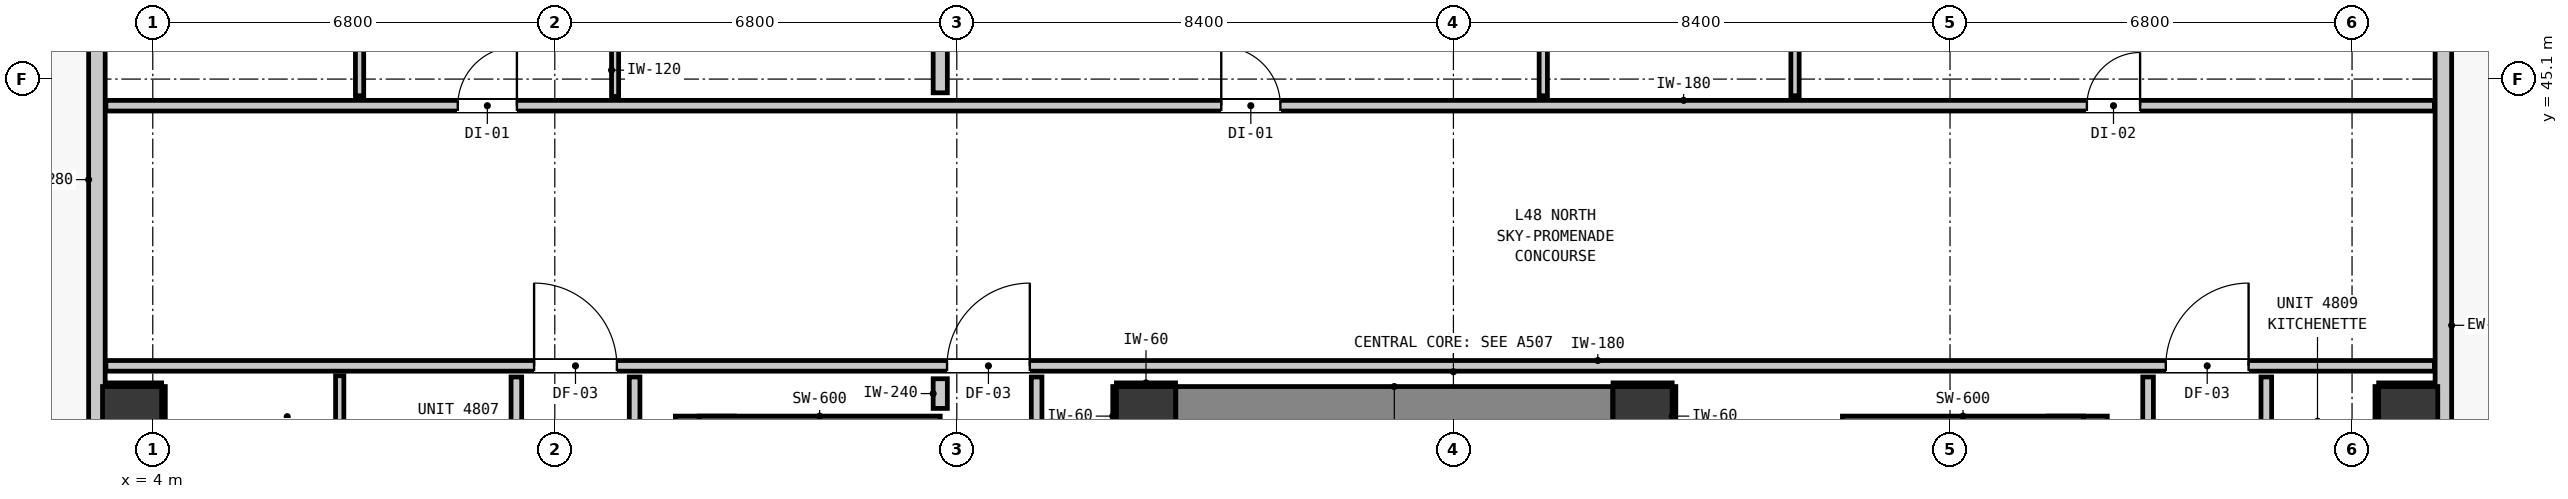
"""IFC4 building model, lengths in metres.
Left out: names, types, materials, properties, quantities, classifications, styles, units other than length and angle.
Written with IfcOpenShell. Run it as: python <this file> out.ifc"""

import sys

from ifc_helpers import new_model, si_unit, direction, frame, frame_2d, origin, origin_2d, place, context, subcontext, project, spatial, rectangle, extrude, element, fill, save


model = new_model("IFC4")
c1 = context("Model", 3, precision=1e-05, world=origin(), true_north=direction((0.0, 1.0)))
c2 = subcontext(c1, "Body", "Model", "MODEL_VIEW")
j1 = project(units=[si_unit("LENGTHUNIT", "METRE"), si_unit("PLANEANGLEUNIT", "RADIAN")], contexts=[c1])
p1 = place(None, origin())
s1 = spatial("IfcSite", under=j1, at=p1, CompositionType="ELEMENT")
p2 = place(p1, origin())
s2 = spatial("IfcBuilding", under=s1, at=p2, CompositionType="ELEMENT")
p3 = place(p2, frame((0.0, 0.0, 165.84)))
s3 = spatial("IfcBuildingStorey", under=s2, at=p3, CompositionType="ELEMENT", Elevation=165.84)
for number, where, z_axis, x_axis in (
    (1, (20.8, 39.4, 0.0), (0.0, 0.0, 1.0), (1.0, 0.0, 0.0)),
    (2, (29.2, 39.4, 0.0), (0.0, 0.0, 1.0), (1.0, 0.0, 0.0)),
):
    element("IfcColumn", number, at=place(p3, frame(where, z_axis=z_axis, x_axis=x_axis)), inside=s3, PredefinedType="COLUMN", context=c2, shape_type="SweptSolid", body=[
        extrude(rectangle(XDim=1.0, YDim=1.0, at=origin_2d()), origin(), (0.0, 0.0, 1.0), 3.32),
    ])
p4 = place(p3, frame((13.34, 31.205, 0.0), z_axis=(0.0, 0.0, 1.0), x_axis=(0.0, 1.0, 0.0)))
e3 = element("IfcWall", 3, at=p4, inside=s3, PredefinedType="SHEAR", context=c2, shape_type="SweptSolid", body=[
    extrude(rectangle(XDim=8.195, YDim=1.0, at=frame_2d((4.097, 0.0))), origin(), (0.0, 0.0, 1.0), 3.32),
])
p5 = place(p3, frame((13.24, 39.1, 0.0), z_axis=(0.0, 0.0, 1.0), x_axis=(1.0, 0.0, 0.0)))
e4 = element("IfcWall", 4, at=p5, inside=s3, PredefinedType="SHEAR", context=c2, shape_type="SweptSolid", body=[
    extrude(rectangle(XDim=4.08, YDim=0.6, at=frame_2d((2.04, 0.0))), origin(), (0.0, 0.0, 1.0), 3.32),
])
p6 = place(p3, frame((36.56, 31.205, 0.0), z_axis=(0.0, 0.0, 1.0), x_axis=(0.0, 1.0, 0.0)))
e5 = element("IfcWall", 5, at=p6, inside=s3, PredefinedType="SHEAR", context=c2, shape_type="SweptSolid", body=[
    extrude(rectangle(XDim=8.195, YDim=1.0, at=frame_2d((4.097, 0.0))), origin(), (0.0, 0.0, 1.0), 3.32),
])
p7 = place(p3, frame((32.58, 39.1, 0.0), z_axis=(0.0, 0.0, 1.0), x_axis=(1.0, 0.0, 0.0)))
e6 = element("IfcWall", 6, at=p7, inside=s3, PredefinedType="SHEAR", context=c2, shape_type="SweptSolid", body=[
    extrude(rectangle(XDim=4.08, YDim=0.6, at=frame_2d((2.04, 0.0))), origin(), (0.0, 0.0, 1.0), 3.32),
])
p8 = place(p3, frame((21.305, 39.4, 0.0), z_axis=(0.0, 0.0, 1.0), x_axis=(1.0, 0.0, 0.0)))
e7 = element("IfcWall", 7, at=p8, inside=s3, PredefinedType="SHEAR", context=c2, shape_type="SweptSolid", body=[
    extrude(rectangle(XDim=7.39, YDim=1.0, at=frame_2d((3.695, 0.0))), origin(), (0.0, 0.0, 1.0), 3.32),
])
for number, where, z_axis, x_axis in (
    (8, (3.65, 39.4, -0.2), (0.0, 0.0, 1.0), (1.0, 0.0, 0.0)),
    (9, (42.15, 39.4, -0.2), (0.0, 0.0, 1.0), (1.0, 0.0, 0.0)),
):
    element("IfcColumn", number, at=place(p3, frame(where, z_axis=z_axis, x_axis=x_axis)), inside=s3, PredefinedType="COLUMN", context=c2, shape_type="SweptSolid", body=[
        extrude(rectangle(XDim=1.0, YDim=1.0, at=origin_2d()), origin(), (0.0, 0.0, 1.0), 3.52),
    ])
p9 = place(p3, frame((3.055, 17.555, 0.0), z_axis=(0.0, 0.0, 1.0), x_axis=(0.0, 1.0, 0.0)))
e10 = element("IfcWall", 10, at=p9, inside=s3, PredefinedType="STANDARD", context=c2, shape_type="SweptSolid", body=[
    extrude(rectangle(XDim=32.29, YDim=0.28, at=frame_2d((16.145, 0.0))), origin(), (0.0, 0.0, 1.0), 3.08),
])
p10 = place(p9, frame((6.871, 0.0, 0.0)))
e11 = element("IfcOpeningElement", 11, at=p10, cuts=e10, PredefinedType="OPENING", context=c2, shape_type="SweptSolid", body=[
    extrude(rectangle(XDim=1.0, YDim=2.15, at=frame_2d((0.5, 1.075))), frame((0.0, 0.15, 0.0), z_axis=(0.0, -1.0, 0.0), x_axis=(1.0, 0.0, 0.0)), (0.0, 0.0, 1.0), 0.3),
])
p11 = place(p9, frame((30.527, 0.0, 0.85)))
e12 = element("IfcOpeningElement", 12, at=p11, cuts=e10, PredefinedType="OPENING", context=c2, shape_type="SweptSolid", body=[
    extrude(rectangle(XDim=1.5, YDim=1.8, at=frame_2d((0.75, 0.9))), frame((0.0, 0.15, 0.0), z_axis=(0.0, -1.0, 0.0), x_axis=(1.0, 0.0, 0.0)), (0.0, 0.0, 1.0), 0.3),
])
p12 = place(p9, frame((8.375, 0.0, 0.85)))
e13 = element("IfcOpeningElement", 13, at=p12, cuts=e10, PredefinedType="OPENING", context=c2, shape_type="SweptSolid", body=[
    extrude(rectangle(XDim=1.5, YDim=1.8, at=frame_2d((0.75, 0.9))), frame((0.0, 0.15, 0.0), z_axis=(0.0, -1.0, 0.0), x_axis=(1.0, 0.0, 0.0)), (0.0, 0.0, 1.0), 0.3),
])
p13 = place(p9, frame((10.762, 0.0, 0.85)))
e14 = element("IfcOpeningElement", 14, at=p13, cuts=e10, PredefinedType="OPENING", context=c2, shape_type="SweptSolid", body=[
    extrude(rectangle(XDim=1.5, YDim=1.8, at=frame_2d((0.75, 0.9))), frame((0.0, 0.15, 0.0), z_axis=(0.0, -1.0, 0.0), x_axis=(1.0, 0.0, 0.0)), (0.0, 0.0, 1.0), 0.3),
])
p14 = place(p9, frame((17.075, 0.0, 0.85)))
e15 = element("IfcOpeningElement", 15, at=p14, cuts=e10, PredefinedType="OPENING", context=c2, shape_type="SweptSolid", body=[
    extrude(rectangle(XDim=1.5, YDim=1.8, at=frame_2d((0.75, 0.9))), frame((0.0, 0.15, 0.0), z_axis=(0.0, -1.0, 0.0), x_axis=(1.0, 0.0, 0.0)), (0.0, 0.0, 1.0), 0.3),
])
p15 = place(p9, frame((20.113, 0.0, 0.85)))
e16 = element("IfcOpeningElement", 16, at=p15, cuts=e10, PredefinedType="OPENING", context=c2, shape_type="SweptSolid", body=[
    extrude(rectangle(XDim=1.05, YDim=1.65, at=frame_2d((0.525, 0.825))), frame((0.0, 0.15, 0.0), z_axis=(0.0, -1.0, 0.0), x_axis=(1.0, 0.0, 0.0)), (0.0, 0.0, 1.0), 0.3),
])
p16 = place(p3, frame((42.745, 49.845, 0.0), z_axis=(0.0, 0.0, 1.0), x_axis=(0.0, -1.0, 0.0)))
e17 = element("IfcWall", 17, at=p16, inside=s3, PredefinedType="STANDARD", context=c2, shape_type="SweptSolid", body=[
    extrude(rectangle(XDim=32.29, YDim=0.28, at=frame_2d((16.145, 0.0))), origin(), (0.0, 0.0, 1.0), 3.08),
])
p17 = place(p16, frame((0.503, 0.0, 0.0)))
e18 = element("IfcOpeningElement", 18, at=p17, cuts=e17, PredefinedType="OPENING", context=c2, shape_type="SweptSolid", body=[
    extrude(rectangle(XDim=1.1, YDim=2.15, at=frame_2d((0.55, 1.075))), frame((0.0, 0.15, 0.0), z_axis=(0.0, -1.0, 0.0), x_axis=(1.0, 0.0, 0.0)), (0.0, 0.0, 1.0), 0.3),
])
p18 = place(p16, frame((2.699, 0.0, 0.85)))
e19 = element("IfcOpeningElement", 19, at=p18, cuts=e17, PredefinedType="OPENING", context=c2, shape_type="SweptSolid", body=[
    extrude(rectangle(XDim=1.5, YDim=1.8, at=frame_2d((0.75, 0.9))), frame((0.0, 0.15, 0.0), z_axis=(0.0, -1.0, 0.0), x_axis=(1.0, 0.0, 0.0)), (0.0, 0.0, 1.0), 0.3),
])
p19 = place(p16, frame((23.17, 0.0, 0.85)))
e20 = element("IfcOpeningElement", 20, at=p19, cuts=e17, PredefinedType="OPENING", context=c2, shape_type="SweptSolid", body=[
    extrude(rectangle(XDim=1.5, YDim=1.8, at=frame_2d((0.75, 0.9))), frame((0.0, 0.15, 0.0), z_axis=(0.0, -1.0, 0.0), x_axis=(1.0, 0.0, 0.0)), (0.0, 0.0, 1.0), 0.3),
])
p20 = place(p16, frame((13.62, 0.0, 0.85)))
e21 = element("IfcOpeningElement", 21, at=p20, cuts=e17, PredefinedType="OPENING", context=c2, shape_type="SweptSolid", body=[
    extrude(rectangle(XDim=1.5, YDim=1.8, at=frame_2d((0.75, 0.9))), frame((0.0, 0.15, 0.0), z_axis=(0.0, -1.0, 0.0), x_axis=(1.0, 0.0, 0.0)), (0.0, 0.0, 1.0), 0.3),
])
p21 = place(p3, frame((3.207, 40.25, 0.0), z_axis=(0.0, 0.0, 1.0), x_axis=(1.0, 0.0, 0.0)))
e22 = element("IfcWall", 22, at=p21, inside=s3, PredefinedType="PARTITIONING", context=c2, shape_type="SweptSolid", body=[
    extrude(rectangle(XDim=39.386, YDim=0.18, at=frame_2d((19.693, 0.0))), origin(), (0.0, 0.0, 1.0), 3.08),
])
p22 = place(p21, frame((14.228, 0.0, 0.0)))
e23 = element("IfcOpeningElement", 23, at=p22, cuts=e22, PredefinedType="OPENING", context=c2, shape_type="SweptSolid", body=[
    extrude(rectangle(XDim=1.4, YDim=2.15, at=frame_2d((0.7, 1.075))), frame((0.0, 0.1, 0.0), z_axis=(0.0, -1.0, 0.0), x_axis=(1.0, 0.0, 0.0)), (0.0, 0.0, 1.0), 0.2),
])
p23 = place(p21, frame((7.243, 0.0, 0.0)))
e24 = element("IfcOpeningElement", 24, at=p23, cuts=e22, PredefinedType="OPENING", context=c2, shape_type="SweptSolid", body=[
    extrude(rectangle(XDim=1.4, YDim=2.15, at=frame_2d((0.7, 1.075))), frame((0.0, 0.1, 0.0), z_axis=(0.0, -1.0, 0.0), x_axis=(1.0, 0.0, 0.0)), (0.0, 0.0, 1.0), 0.2),
])
p24 = place(p21, frame((34.843, 0.0, 0.0)))
e25 = element("IfcOpeningElement", 25, at=p24, cuts=e22, PredefinedType="OPENING", context=c2, shape_type="SweptSolid", body=[
    extrude(rectangle(XDim=1.4, YDim=2.15, at=frame_2d((0.7, 1.075))), frame((0.0, 0.1, 0.0), z_axis=(0.0, -1.0, 0.0), x_axis=(1.0, 0.0, 0.0)), (0.0, 0.0, 1.0), 0.2),
])
p25 = place(p3, frame((3.207, 44.65, 0.0), z_axis=(0.0, 0.0, 1.0), x_axis=(1.0, 0.0, 0.0)))
e26 = element("IfcWall", 26, at=p25, inside=s3, PredefinedType="PARTITIONING", context=c2, shape_type="SweptSolid", body=[
    extrude(rectangle(XDim=39.386, YDim=0.18, at=frame_2d((19.693, 0.0))), origin(), (0.0, 0.0, 1.0), 3.08),
])
p26 = place(p25, frame((5.952, 0.0, 0.0)))
e27 = element("IfcOpeningElement", 27, at=p26, cuts=e26, PredefinedType="OPENING", context=c2, shape_type="SweptSolid", body=[
    extrude(rectangle(XDim=1.0, YDim=2.15, at=frame_2d((0.5, 1.075))), frame((0.0, 0.1, 0.0), z_axis=(0.0, -1.0, 0.0), x_axis=(1.0, 0.0, 0.0)), (0.0, 0.0, 1.0), 0.2),
])
p27 = place(p25, frame((18.866, 0.0, 0.0)))
e28 = element("IfcOpeningElement", 28, at=p27, cuts=e26, PredefinedType="OPENING", context=c2, shape_type="SweptSolid", body=[
    extrude(rectangle(XDim=1.0, YDim=2.15, at=frame_2d((0.5, 1.075))), frame((0.0, 0.1, 0.0), z_axis=(0.0, -1.0, 0.0), x_axis=(1.0, 0.0, 0.0)), (0.0, 0.0, 1.0), 0.2),
])
p28 = place(p25, frame((33.508, 0.0, 0.0)))
e29 = element("IfcOpeningElement", 29, at=p28, cuts=e26, PredefinedType="OPENING", context=c2, shape_type="SweptSolid", body=[
    extrude(rectangle(XDim=0.9, YDim=2.1, at=frame_2d((0.45, 1.05))), frame((0.0, 0.1, 0.0), z_axis=(0.0, -1.0, 0.0), x_axis=(1.0, 0.0, 0.0)), (0.0, 0.0, 1.0), 0.2),
])
p29 = place(p3, frame((17.32, 39.53, 0.0), z_axis=(0.0, 0.0, 1.0), x_axis=(0.0, 1.0, 0.0)))
e30 = element("IfcWall", 30, at=p29, inside=s3, PredefinedType="PARTITIONING", context=c2, shape_type="SweptSolid", body=[
    extrude(rectangle(XDim=0.502, YDim=0.24, at=frame_2d((0.251, 0.0))), origin(), (0.0, 0.0, 1.0), 3.08),
])
p30 = place(p3, frame((17.32, 44.868, 0.0), z_axis=(0.0, 0.0, 1.0), x_axis=(0.0, 1.0, 0.0)))
e31 = element("IfcWall", 31, at=p30, inside=s3, PredefinedType="PARTITIONING", context=c2, shape_type="SweptSolid", body=[
    extrude(rectangle(XDim=2.744, YDim=0.24, at=frame_2d((1.372, 0.0))), origin(), (0.0, 0.0, 1.0), 3.08),
])
p31 = place(p3, frame((10.15, 37.553, 0.0), z_axis=(0.0, 0.0, 1.0), x_axis=(0.0, 1.0, 0.0)))
e32 = element("IfcWall", 32, at=p31, inside=s3, PredefinedType="PARTITIONING", context=c2, shape_type="SweptSolid", body=[
    extrude(rectangle(XDim=2.509, YDim=0.18, at=frame_2d((1.254, 0.0))), origin(), (0.0, 0.0, 1.0), 3.08),
])
p32 = place(p3, frame((12.15, 21.368, 0.0), z_axis=(0.0, 0.0, 1.0), x_axis=(0.0, 1.0, 0.0)))
e33 = element("IfcWall", 33, at=p32, inside=s3, PredefinedType="PARTITIONING", context=c2, shape_type="SweptSolid", body=[
    extrude(rectangle(XDim=18.694, YDim=0.18, at=frame_2d((9.347, 0.0))), origin(), (0.0, 0.0, 1.0), 3.08),
])
p33 = place(p3, frame((18.95, 39.058, 0.0), z_axis=(0.0, 0.0, 1.0), x_axis=(0.0, 1.0, 0.0)))
e34 = element("IfcWall", 34, at=p33, inside=s3, PredefinedType="PARTITIONING", context=c2, shape_type="SweptSolid", body=[
    extrude(rectangle(XDim=1.004, YDim=0.18, at=frame_2d((0.502, 0.0))), origin(), (0.0, 0.0, 1.0), 3.08),
])
p34 = place(p3, frame((37.75, 21.368, 0.0), z_axis=(0.0, 0.0, 1.0), x_axis=(0.0, 1.0, 0.0)))
e35 = element("IfcWall", 35, at=p34, inside=s3, PredefinedType="PARTITIONING", context=c2, shape_type="SweptSolid", body=[
    extrude(rectangle(XDim=18.694, YDim=0.18, at=frame_2d((9.347, 0.0))), origin(), (0.0, 0.0, 1.0), 3.08),
])
p35 = place(p3, frame((39.75, 37.553, 0.0), z_axis=(0.0, 0.0, 1.0), x_axis=(0.0, 1.0, 0.0)))
e36 = element("IfcWall", 36, at=p35, inside=s3, PredefinedType="PARTITIONING", context=c2, shape_type="SweptSolid", body=[
    extrude(rectangle(XDim=2.509, YDim=0.18, at=frame_2d((1.254, 0.0))), origin(), (0.0, 0.0, 1.0), 3.08),
])
p36 = place(p3, frame((7.162, 37.533, 0.0), z_axis=(0.0, 0.0, 1.0), x_axis=(0.0, 1.0, 0.0)))
e37 = element("IfcWall", 37, at=p36, inside=s3, PredefinedType="PARTITIONING", context=c2, shape_type="SweptSolid", body=[
    extrude(rectangle(XDim=2.549, YDim=0.14, at=frame_2d((1.274, 0.0))), origin(), (0.0, 0.0, 1.0), 3.08),
])
p37 = place(p3, frame((7.498, 44.818, 0.0), z_axis=(0.0, 0.0, 1.0), x_axis=(0.0, 1.0, 0.0)))
e38 = element("IfcWall", 38, at=p37, inside=s3, PredefinedType="PARTITIONING", context=c2, shape_type="SweptSolid", body=[
    extrude(rectangle(XDim=2.844, YDim=0.14, at=frame_2d((1.422, 0.0))), origin(), (0.0, 0.0, 1.0), 3.08),
])
p38 = place(p37, frame((0.995, 0.0, 0.0)))
e39 = element("IfcOpeningElement", 39, at=p38, cuts=e38, PredefinedType="OPENING", context=c2, shape_type="SweptSolid", body=[
    extrude(rectangle(XDim=0.86, YDim=2.02, at=frame_2d((0.43, 1.01))), frame((0.0, 0.08, 0.0), z_axis=(0.0, -1.0, 0.0), x_axis=(1.0, 0.0, 0.0)), (0.0, 0.0, 1.0), 0.16),
])
p39 = place(p3, frame((27.52, 44.818, 0.0), z_axis=(0.0, 0.0, 1.0), x_axis=(0.0, 1.0, 0.0)))
e40 = element("IfcWall", 40, at=p39, inside=s3, PredefinedType="PARTITIONING", context=c2, shape_type="SweptSolid", body=[
    extrude(rectangle(XDim=7.175, YDim=0.14, at=frame_2d((3.587, 0.0))), origin(), (0.0, 0.0, 1.0), 3.08),
])
p40 = place(p39, frame((0.975, 0.0, 0.0)))
e41 = element("IfcOpeningElement", 41, at=p40, cuts=e40, PredefinedType="OPENING", context=c2, shape_type="SweptSolid", body=[
    extrude(rectangle(XDim=0.9, YDim=2.1, at=frame_2d((0.45, 1.05))), frame((0.0, 0.08, 0.0), z_axis=(0.0, -1.0, 0.0), x_axis=(1.0, 0.0, 0.0)), (0.0, 0.0, 1.0), 0.16),
])
p41 = place(p39, frame((4.644, 0.0, 0.0)))
e42 = element("IfcOpeningElement", 42, at=p41, cuts=e40, PredefinedType="OPENING", context=c2, shape_type="SweptSolid", body=[
    extrude(rectangle(XDim=0.86, YDim=2.02, at=frame_2d((0.43, 1.01))), frame((0.0, 0.08, 0.0), z_axis=(0.0, -1.0, 0.0), x_axis=(1.0, 0.0, 0.0)), (0.0, 0.0, 1.0), 0.16),
])
p42 = place(p3, frame((31.778, 44.818, 0.0), z_axis=(0.0, 0.0, 1.0), x_axis=(0.0, 1.0, 0.0)))
e43 = element("IfcWall", 43, at=p42, inside=s3, PredefinedType="PARTITIONING", context=c2, shape_type="SweptSolid", body=[
    extrude(rectangle(XDim=2.844, YDim=0.14, at=frame_2d((1.422, 0.0))), origin(), (0.0, 0.0, 1.0), 3.08),
])
p43 = place(p3, frame((11.82, 44.808, 0.0), z_axis=(0.0, 0.0, 1.0), x_axis=(0.0, 1.0, 0.0)))
e44 = element("IfcWall", 44, at=p43, inside=s3, PredefinedType="PARTITIONING", context=c2, shape_type="SweptSolid", body=[
    extrude(rectangle(XDim=2.864, YDim=0.12, at=frame_2d((1.432, 0.0))), origin(), (0.0, 0.0, 1.0), 3.08),
])
p44 = place(p43, frame((0.985, 0.0, 0.0)))
e45 = element("IfcOpeningElement", 45, at=p44, cuts=e44, PredefinedType="OPENING", context=c2, shape_type="SweptSolid", body=[
    extrude(rectangle(XDim=0.9, YDim=2.1, at=frame_2d((0.45, 1.05))), frame((0.0, 0.07, 0.0), z_axis=(0.0, -1.0, 0.0), x_axis=(1.0, 0.0, 0.0)), (0.0, 0.0, 1.0), 0.14),
])
for number, where, z_axis, x_axis in (
    (46, (20.3, 39.932, 0.0), (0.0, 0.0, 1.0), (1.0, 0.0, 0.0)),
    (47, (20.268, 38.9, 0.0), (0.0, 0.0, 1.0), (0.0, 1.0, 0.0)),
    (48, (28.7, 39.932, 0.0), (0.0, 0.0, 1.0), (1.0, 0.0, 0.0)),
    (49, (29.732, 38.9, 0.0), (0.0, 0.0, 1.0), (0.0, 1.0, 0.0)),
):
    element("IfcWall", number, at=place(p3, frame(where, z_axis=z_axis, x_axis=x_axis)), inside=s3, PredefinedType="PARTITIONING", context=c2, shape_type="SweptSolid", body=[
        extrude(rectangle(XDim=1.0, YDim=0.06, at=frame_2d((0.5, 0.0))), origin(), (0.0, 0.0, 1.0), 1.45),
    ])
p45 = place(p3, frame((3.21, 39.932, 0.0), z_axis=(0.0, 0.0, 1.0), x_axis=(1.0, 0.0, 0.0)))
e50 = element("IfcWall", 50, at=p45, inside=s3, PredefinedType="PARTITIONING", context=c2, shape_type="SweptSolid", body=[
    extrude(rectangle(XDim=0.94, YDim=0.06, at=frame_2d((0.47, 0.0))), origin(), (0.0, 0.0, 1.0), 1.45),
])
p46 = place(p3, frame((4.182, 38.9, 0.0), z_axis=(0.0, 0.0, 1.0), x_axis=(0.0, 1.0, 0.0)))
e51 = element("IfcWall", 51, at=p46, inside=s3, PredefinedType="PARTITIONING", context=c2, shape_type="SweptSolid", body=[
    extrude(rectangle(XDim=1.0, YDim=0.06, at=frame_2d((0.5, 0.0))), origin(), (0.0, 0.0, 1.0), 1.45),
])
p47 = place(p3, frame((41.65, 39.932, 0.0), z_axis=(0.0, 0.0, 1.0), x_axis=(1.0, 0.0, 0.0)))
e52 = element("IfcWall", 52, at=p47, inside=s3, PredefinedType="PARTITIONING", context=c2, shape_type="SweptSolid", body=[
    extrude(rectangle(XDim=0.94, YDim=0.06, at=frame_2d((0.47, 0.0))), origin(), (0.0, 0.0, 1.0), 1.45),
])
p48 = place(p3, frame((41.618, 38.9, 0.0), z_axis=(0.0, 0.0, 1.0), x_axis=(0.0, 1.0, 0.0)))
e53 = element("IfcWall", 53, at=p48, inside=s3, PredefinedType="PARTITIONING", context=c2, shape_type="SweptSolid", body=[
    extrude(rectangle(XDim=1.0, YDim=0.06, at=frame_2d((0.5, 0.0))), origin(), (0.0, 0.0, 1.0), 1.45),
])
p49 = place(p22, origin())
e54 = element("IfcDoor", 54, at=p49, inside=s3, OperationType="SINGLE_SWING_RIGHT", PredefinedType="DOOR", context=c2, shape_type="SweptSolid", body=[
    extrude(rectangle(XDim=1.4, YDim=2.15, at=frame_2d((0.7, 1.075))), frame((0.0, 0.025, 0.0), z_axis=(0.0, -1.0, 0.0), x_axis=(1.0, 0.0, 0.0)), (0.0, 0.0, 1.0), 0.05),
])
fill(e23, e54)
p50 = place(p23, origin())
e55 = element("IfcDoor", 55, at=p50, inside=s3, OperationType="SINGLE_SWING_LEFT", PredefinedType="DOOR", context=c2, shape_type="SweptSolid", body=[
    extrude(rectangle(XDim=1.4, YDim=2.15, at=frame_2d((0.7, 1.075))), frame((0.0, 0.025, 0.0), z_axis=(0.0, -1.0, 0.0), x_axis=(1.0, 0.0, 0.0)), (0.0, 0.0, 1.0), 0.05),
])
fill(e24, e55)
p51 = place(p24, origin())
e56 = element("IfcDoor", 56, at=p51, inside=s3, OperationType="SINGLE_SWING_RIGHT", PredefinedType="DOOR", context=c2, shape_type="SweptSolid", body=[
    extrude(rectangle(XDim=1.4, YDim=2.15, at=frame_2d((0.7, 1.075))), frame((0.0, 0.025, 0.0), z_axis=(0.0, -1.0, 0.0), x_axis=(1.0, 0.0, 0.0)), (0.0, 0.0, 1.0), 0.05),
])
fill(e25, e56)
p52 = place(p26, origin())
e57 = element("IfcDoor", 57, at=p52, inside=s3, OperationType="SINGLE_SWING_RIGHT", PredefinedType="DOOR", context=c2, shape_type="SweptSolid", body=[
    extrude(rectangle(XDim=1.0, YDim=2.15, at=frame_2d((0.5, 1.075))), frame((0.0, 0.025, 0.0), z_axis=(0.0, -1.0, 0.0), x_axis=(1.0, 0.0, 0.0)), (0.0, 0.0, 1.0), 0.05),
])
fill(e27, e57)
p53 = place(p27, origin())
e58 = element("IfcDoor", 58, at=p53, inside=s3, OperationType="SINGLE_SWING_LEFT", PredefinedType="DOOR", context=c2, shape_type="SweptSolid", body=[
    extrude(rectangle(XDim=1.0, YDim=2.15, at=frame_2d((0.5, 1.075))), frame((0.0, 0.025, 0.0), z_axis=(0.0, -1.0, 0.0), x_axis=(1.0, 0.0, 0.0)), (0.0, 0.0, 1.0), 0.05),
])
fill(e28, e58)
p54 = place(p28, origin())
e59 = element("IfcDoor", 59, at=p54, inside=s3, OperationType="SINGLE_SWING_RIGHT", PredefinedType="DOOR", context=c2, shape_type="SweptSolid", body=[
    extrude(rectangle(XDim=0.9, YDim=2.1, at=frame_2d((0.45, 1.05))), frame((0.0, 0.025, 0.0), z_axis=(0.0, -1.0, 0.0), x_axis=(1.0, 0.0, 0.0)), (0.0, 0.0, 1.0), 0.05),
])
fill(e29, e59)
save(model, sys.argv[1])
